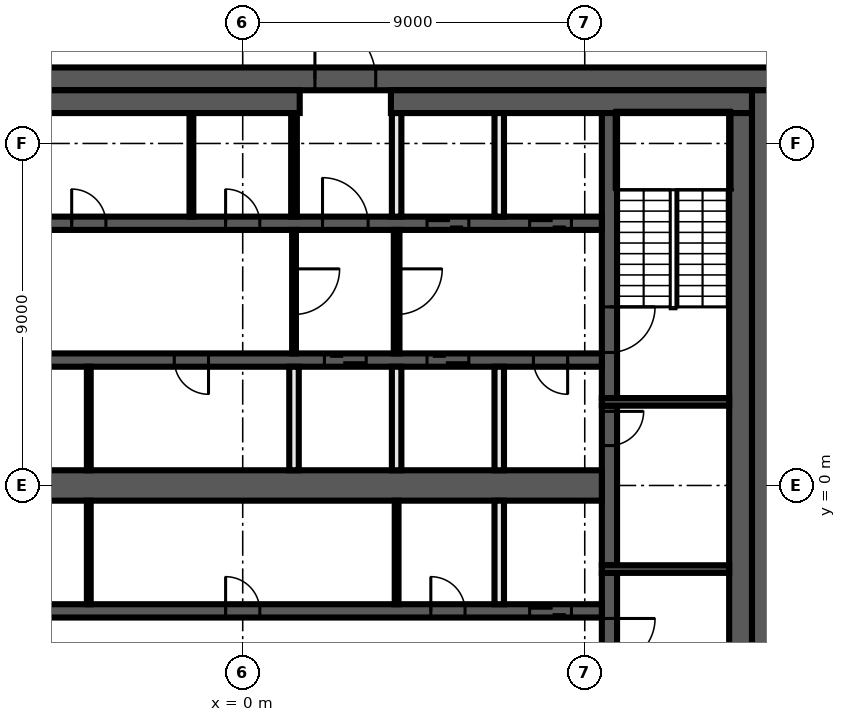
"""IFC4 building model, lengths in metres.
Left out: names, types, materials, properties, quantities, classifications, styles, units other than length and angle.
Written with IfcOpenShell. Run it as: python <this file> out.ifc"""

import sys

from ifc_helpers import new_model, si_unit, direction, frame, frame_2d, origin, place, context, subcontext, project, spatial, rectangle, extrude, element, fill, save


model = new_model("IFC4")
c1 = context("Model", 3, precision=1e-05, world=origin(), true_north=direction((0.0, 1.0)))
c2 = subcontext(c1, "Body", "Model", "MODEL_VIEW")
j1 = project(units=[si_unit("LENGTHUNIT", "METRE"), si_unit("PLANEANGLEUNIT", "RADIAN")], contexts=[c1])
p1 = place(None, origin())
s1 = spatial("IfcSite", under=j1, at=p1, CompositionType="ELEMENT")
p2 = place(p1, origin())
s2 = spatial("IfcBuilding", under=s1, at=p2, CompositionType="ELEMENT")
p3 = place(p2, frame((0.0, 0.0, 348.8)))
s3 = spatial("IfcBuildingStorey", under=s2, at=p3, CompositionType="ELEMENT", Elevation=348.8)
p4 = place(p3, frame((-14.0, 10.7, 0.0), z_axis=(0.0, 0.0, 1.0), x_axis=(1.0, 0.0, 0.0)))
e1 = element("IfcWall", 1, at=p4, inside=s3, PredefinedType="SHEAR", context=c2, shape_type="SweptSolid", body=[
    extrude(rectangle(XDim=28.0, YDim=0.6, at=frame_2d((14.0, 0.0))), origin(), (0.0, 0.0, 1.0), 3.7),
])
p5 = place(p4, frame((15.9, 0.0, 0.0)))
e2 = element("IfcOpeningElement", 2, at=p5, cuts=e1, PredefinedType="OPENING", context=c2, shape_type="SweptSolid", body=[
    extrude(rectangle(XDim=1.6, YDim=2.1, at=frame_2d((0.8, 1.05))), frame((0.0, 0.31, 0.0), z_axis=(0.0, -1.0, 0.0), x_axis=(1.0, 0.0, 0.0)), (0.0, 0.0, 1.0), 0.62),
])
p6 = place(p3, frame((13.7, 10.4, 0.0), z_axis=(0.0, 0.0, 1.0), x_axis=(0.0, -1.0, 0.0)))
e3 = element("IfcWall", 3, at=p6, inside=s3, PredefinedType="SHEAR", context=c2, shape_type="SweptSolid", body=[
    extrude(rectangle(XDim=20.8, YDim=0.6, at=frame_2d((10.4, 0.0))), origin(), (0.0, 0.0, 1.0), 3.7),
])
p7 = place(p3, frame((-13.4, 10.1, 0.0), z_axis=(0.0, 0.0, 1.0), x_axis=(1.0, 0.0, 0.0)))
e4 = element("IfcWall", 4, at=p7, inside=s3, PredefinedType="SHEAR", context=c2, shape_type="SweptSolid", body=[
    extrude(rectangle(XDim=14.9, YDim=0.6, at=frame_2d((7.45, 0.0))), origin(), (0.0, 0.0, 1.0), 3.7),
])
p8 = place(p3, frame((3.9, 10.1, 0.0), z_axis=(0.0, 0.0, 1.0), x_axis=(1.0, 0.0, 0.0)))
e5 = element("IfcWall", 5, at=p8, inside=s3, PredefinedType="SHEAR", context=c2, shape_type="SweptSolid", body=[
    extrude(rectangle(XDim=9.5, YDim=0.6, at=frame_2d((4.75, 0.0))), origin(), (0.0, 0.0, 1.0), 3.7),
])
p9 = place(p3, frame((13.1, 9.8, 0.0), z_axis=(0.0, 0.0, 1.0), x_axis=(0.0, -1.0, 0.0)))
e6 = element("IfcWall", 6, at=p9, inside=s3, PredefinedType="SHEAR", context=c2, shape_type="SweptSolid", body=[
    extrude(rectangle(XDim=19.6, YDim=0.6, at=frame_2d((9.8, 0.0))), origin(), (0.0, 0.0, 1.0), 3.7),
])
p10 = place(p3, frame((9.65, -2.3, 0.0), z_axis=(0.0, 0.0, 1.0), x_axis=(0.0, -1.0, 0.0)))
e7 = element("IfcWall", 7, at=p10, inside=s3, PredefinedType="SHEAR", context=c2, shape_type="SweptSolid", body=[
    extrude(rectangle(XDim=7.5, YDim=0.4, at=frame_2d((3.75, 0.0))), origin(), (0.0, 0.0, 1.0), 3.7),
])
p11 = place(p10, frame((1.2, 0.0, 0.0)))
e8 = element("IfcOpeningElement", 8, at=p11, cuts=e7, PredefinedType="OPENING", context=c2, shape_type="SweptSolid", body=[
    extrude(rectangle(XDim=1.2, YDim=2.1, at=frame_2d((0.6, 1.05))), frame((0.0, 0.21, 0.0), z_axis=(0.0, -1.0, 0.0), x_axis=(1.0, 0.0, 0.0)), (0.0, 0.0, 1.0), 0.42),
])
p12 = place(p3, frame((9.65, 2.1, 0.0), z_axis=(0.0, 0.0, 1.0), x_axis=(0.0, -1.0, 0.0)))
e9 = element("IfcWall", 9, at=p12, inside=s3, PredefinedType="SHEAR", context=c2, shape_type="SweptSolid", body=[
    extrude(rectangle(XDim=4.2, YDim=0.4, at=frame_2d((2.1, 0.0))), origin(), (0.0, 0.0, 1.0), 3.7),
])
p13 = place(p12, frame((0.15, 0.0, 0.0)))
e10 = element("IfcOpeningElement", 10, at=p13, cuts=e9, PredefinedType="OPENING", context=c2, shape_type="SweptSolid", body=[
    extrude(rectangle(XDim=0.9, YDim=2.1, at=frame_2d((0.45, 1.05))), frame((0.0, 0.21, 0.0), z_axis=(0.0, -1.0, 0.0), x_axis=(1.0, 0.0, 0.0)), (0.0, 0.0, 1.0), 0.42),
])
p14 = place(p3, frame((9.65, 9.8, 0.0), z_axis=(0.0, 0.0, 1.0), x_axis=(0.0, -1.0, 0.0)))
e11 = element("IfcWall", 11, at=p14, inside=s3, PredefinedType="SHEAR", context=c2, shape_type="SweptSolid", body=[
    extrude(rectangle(XDim=7.5, YDim=0.4, at=frame_2d((3.75, 0.0))), origin(), (0.0, 0.0, 1.0), 3.7),
])
p15 = place(p14, frame((5.1, 0.0, 0.0)))
e12 = element("IfcOpeningElement", 12, at=p15, cuts=e11, PredefinedType="OPENING", context=c2, shape_type="SweptSolid", body=[
    extrude(rectangle(XDim=1.2, YDim=2.1, at=frame_2d((0.6, 1.05))), frame((0.0, 0.21, 0.0), z_axis=(0.0, -1.0, 0.0), x_axis=(1.0, 0.0, 0.0)), (0.0, 0.0, 1.0), 0.42),
])
for number, where, z_axis, x_axis in (
    (13, (9.45, 2.2, 0.0), (0.0, 0.0, 1.0), (1.0, 0.0, 0.0)),
    (14, (9.45, -2.2, 0.0), (0.0, 0.0, 1.0), (1.0, 0.0, 0.0)),
):
    element("IfcWall", number, at=place(p3, frame(where, z_axis=z_axis, x_axis=x_axis)), inside=s3, PredefinedType="SHEAR", context=c2, shape_type="SweptSolid", body=[
        extrude(rectangle(XDim=3.35, YDim=0.2, at=frame_2d((1.675, 0.0))), origin(), (0.0, 0.0, 1.0), 3.7),
    ])
p16 = place(p3, frame((-9.45, 6.9, 0.0), z_axis=(0.0, 0.0, 1.0), x_axis=(1.0, 0.0, 0.0)))
e15 = element("IfcWall", 15, at=p16, inside=s3, PredefinedType="SHEAR", context=c2, shape_type="SweptSolid", body=[
    extrude(rectangle(XDim=18.9, YDim=0.35, at=frame_2d((9.45, 0.0))), origin(), (0.0, 0.0, 1.0), 3.7),
])
p17 = place(p16, frame((11.55, 0.0, 0.0)))
e16 = element("IfcOpeningElement", 16, at=p17, cuts=e15, PredefinedType="OPENING", context=c2, shape_type="SweptSolid", body=[
    extrude(rectangle(XDim=1.2, YDim=2.1, at=frame_2d((0.6, 1.05))), frame((0.0, 0.185, 0.0), z_axis=(0.0, -1.0, 0.0), x_axis=(1.0, 0.0, 0.0)), (0.0, 0.0, 1.0), 0.37),
])
p18 = place(p16, frame((14.3, 0.0, 0.0)))
e17 = element("IfcOpeningElement", 17, at=p18, cuts=e15, PredefinedType="OPENING", context=c2, shape_type="SweptSolid", body=[
    extrude(rectangle(XDim=1.1, YDim=2.1, at=frame_2d((0.55, 1.05))), frame((0.0, 0.185, 0.0), z_axis=(0.0, -1.0, 0.0), x_axis=(1.0, 0.0, 0.0)), (0.0, 0.0, 1.0), 0.37),
])
p19 = place(p16, frame((17.0, 0.0, 0.0)))
e18 = element("IfcOpeningElement", 18, at=p19, cuts=e15, PredefinedType="OPENING", context=c2, shape_type="SweptSolid", body=[
    extrude(rectangle(XDim=1.1, YDim=2.1, at=frame_2d((0.55, 1.05))), frame((0.0, 0.185, 0.0), z_axis=(0.0, -1.0, 0.0), x_axis=(1.0, 0.0, 0.0)), (0.0, 0.0, 1.0), 0.37),
])
p20 = place(p16, frame((0.9, 0.0, 0.0)))
e19 = element("IfcOpeningElement", 19, at=p20, cuts=e15, PredefinedType="OPENING", context=c2, shape_type="SweptSolid", body=[
    extrude(rectangle(XDim=0.9, YDim=2.1, at=frame_2d((0.45, 1.05))), frame((0.0, 0.185, 0.0), z_axis=(0.0, -1.0, 0.0), x_axis=(1.0, 0.0, 0.0)), (0.0, 0.0, 1.0), 0.37),
])
p21 = place(p16, frame((4.95, 0.0, 0.0)))
e20 = element("IfcOpeningElement", 20, at=p21, cuts=e15, PredefinedType="OPENING", context=c2, shape_type="SweptSolid", body=[
    extrude(rectangle(XDim=0.9, YDim=2.1, at=frame_2d((0.45, 1.05))), frame((0.0, 0.185, 0.0), z_axis=(0.0, -1.0, 0.0), x_axis=(1.0, 0.0, 0.0)), (0.0, 0.0, 1.0), 0.37),
])
p22 = place(p16, frame((9.0, 0.0, 0.0)))
e21 = element("IfcOpeningElement", 21, at=p22, cuts=e15, PredefinedType="OPENING", context=c2, shape_type="SweptSolid", body=[
    extrude(rectangle(XDim=0.9, YDim=2.1, at=frame_2d((0.45, 1.05))), frame((0.0, 0.185, 0.0), z_axis=(0.0, -1.0, 0.0), x_axis=(1.0, 0.0, 0.0)), (0.0, 0.0, 1.0), 0.37),
])
p23 = place(p3, frame((9.45, 3.3, 0.0), z_axis=(0.0, 0.0, 1.0), x_axis=(-1.0, 0.0, 0.0)))
e22 = element("IfcWall", 22, at=p23, inside=s3, PredefinedType="SHEAR", context=c2, shape_type="SweptSolid", body=[
    extrude(rectangle(XDim=18.9, YDim=0.35, at=frame_2d((9.45, 0.0))), origin(), (0.0, 0.0, 1.0), 3.7),
])
p24 = place(p23, frame((6.2, 0.0, 0.0)))
e23 = element("IfcOpeningElement", 23, at=p24, cuts=e22, PredefinedType="OPENING", context=c2, shape_type="SweptSolid", body=[
    extrude(rectangle(XDim=1.1, YDim=2.1, at=frame_2d((0.55, 1.05))), frame((0.0, 0.185, 0.0), z_axis=(0.0, -1.0, 0.0), x_axis=(1.0, 0.0, 0.0)), (0.0, 0.0, 1.0), 0.37),
])
p25 = place(p23, frame((3.5, 0.0, 0.0)))
e24 = element("IfcOpeningElement", 24, at=p25, cuts=e22, PredefinedType="OPENING", context=c2, shape_type="SweptSolid", body=[
    extrude(rectangle(XDim=1.1, YDim=2.1, at=frame_2d((0.55, 1.05))), frame((0.0, 0.185, 0.0), z_axis=(0.0, -1.0, 0.0), x_axis=(1.0, 0.0, 0.0)), (0.0, 0.0, 1.0), 0.37),
])
p26 = place(p23, frame((0.9, 0.0, 0.0)))
e25 = element("IfcOpeningElement", 25, at=p26, cuts=e22, PredefinedType="OPENING", context=c2, shape_type="SweptSolid", body=[
    extrude(rectangle(XDim=0.9, YDim=2.1, at=frame_2d((0.45, 1.05))), frame((0.0, 0.185, 0.0), z_axis=(0.0, -1.0, 0.0), x_axis=(1.0, 0.0, 0.0)), (0.0, 0.0, 1.0), 0.37),
])
p27 = place(p23, frame((15.75, 0.0, 0.0)))
e26 = element("IfcOpeningElement", 26, at=p27, cuts=e22, PredefinedType="OPENING", context=c2, shape_type="SweptSolid", body=[
    extrude(rectangle(XDim=0.9, YDim=2.1, at=frame_2d((0.45, 1.05))), frame((0.0, 0.185, 0.0), z_axis=(0.0, -1.0, 0.0), x_axis=(1.0, 0.0, 0.0)), (0.0, 0.0, 1.0), 0.37),
])
p28 = place(p23, frame((10.35, 0.0, 0.0)))
e27 = element("IfcOpeningElement", 27, at=p28, cuts=e22, PredefinedType="OPENING", context=c2, shape_type="SweptSolid", body=[
    extrude(rectangle(XDim=0.9, YDim=2.1, at=frame_2d((0.45, 1.05))), frame((0.0, 0.185, 0.0), z_axis=(0.0, -1.0, 0.0), x_axis=(1.0, 0.0, 0.0)), (0.0, 0.0, 1.0), 0.37),
])
p29 = place(p3, frame((-9.45, -3.3, 0.0), z_axis=(0.0, 0.0, 1.0), x_axis=(1.0, 0.0, 0.0)))
e28 = element("IfcWall", 28, at=p29, inside=s3, PredefinedType="SHEAR", context=c2, shape_type="SweptSolid", body=[
    extrude(rectangle(XDim=18.9, YDim=0.35, at=frame_2d((9.45, 0.0))), origin(), (0.0, 0.0, 1.0), 3.7),
])
p30 = place(p29, frame((17.0, 0.0, 0.0)))
e29 = element("IfcOpeningElement", 29, at=p30, cuts=e28, PredefinedType="OPENING", context=c2, shape_type="SweptSolid", body=[
    extrude(rectangle(XDim=1.1, YDim=2.1, at=frame_2d((0.55, 1.05))), frame((0.0, 0.185, 0.0), z_axis=(0.0, -1.0, 0.0), x_axis=(1.0, 0.0, 0.0)), (0.0, 0.0, 1.0), 0.37),
])
p31 = place(p29, frame((2.25, 0.0, 0.0)))
e30 = element("IfcOpeningElement", 30, at=p31, cuts=e28, PredefinedType="OPENING", context=c2, shape_type="SweptSolid", body=[
    extrude(rectangle(XDim=0.9, YDim=2.1, at=frame_2d((0.45, 1.05))), frame((0.0, 0.185, 0.0), z_axis=(0.0, -1.0, 0.0), x_axis=(1.0, 0.0, 0.0)), (0.0, 0.0, 1.0), 0.37),
])
p32 = place(p29, frame((9.0, 0.0, 0.0)))
e31 = element("IfcOpeningElement", 31, at=p32, cuts=e28, PredefinedType="OPENING", context=c2, shape_type="SweptSolid", body=[
    extrude(rectangle(XDim=0.9, YDim=2.1, at=frame_2d((0.45, 1.05))), frame((0.0, 0.185, 0.0), z_axis=(0.0, -1.0, 0.0), x_axis=(1.0, 0.0, 0.0)), (0.0, 0.0, 1.0), 0.37),
])
p33 = place(p29, frame((14.4, 0.0, 0.0)))
e32 = element("IfcOpeningElement", 32, at=p33, cuts=e28, PredefinedType="OPENING", context=c2, shape_type="SweptSolid", body=[
    extrude(rectangle(XDim=0.9, YDim=2.1, at=frame_2d((0.45, 1.05))), frame((0.0, 0.185, 0.0), z_axis=(0.0, -1.0, 0.0), x_axis=(1.0, 0.0, 0.0)), (0.0, 0.0, 1.0), 0.37),
])
p34 = place(p3, frame((-9.45, 0.0, 0.0), z_axis=(0.0, 0.0, 1.0), x_axis=(1.0, 0.0, 0.0)))
e33 = element("IfcWall", 33, at=p34, inside=s3, PredefinedType="SHEAR", context=c2, shape_type="SweptSolid", body=[
    extrude(rectangle(XDim=18.9, YDim=0.8, at=frame_2d((9.45, 0.0))), origin(), (0.0, 0.0, 1.0), 3.7),
])
for number, where, z_axis, x_axis in (
    (34, (6.75, -3.125, 0.0), (0.0, 0.0, 1.0), (0.0, 1.0, 0.0)),
    (35, (6.75, 0.4, 0.0), (0.0, 0.0, 1.0), (0.0, 1.0, 0.0)),
    (36, (6.75, 7.075, 0.0), (0.0, 0.0, 1.0), (0.0, 1.0, 0.0)),
):
    element("IfcWall", number, at=place(p3, frame(where, z_axis=z_axis, x_axis=x_axis)), inside=s3, PredefinedType="SOLIDWALL", context=c2, shape_type="SweptSolid", body=[
        extrude(rectangle(XDim=2.725, YDim=0.25, at=frame_2d((1.363, 0.0))), origin(), (0.0, 0.0, 1.0), 3.7),
    ])
p35 = place(p3, frame((4.05, 6.725, 0.0), z_axis=(0.0, 0.0, 1.0), x_axis=(0.0, -1.0, 0.0)))
e37 = element("IfcWall", 37, at=p35, inside=s3, PredefinedType="PARTITIONING", context=c2, shape_type="SweptSolid", body=[
    extrude(rectangle(XDim=3.25, YDim=0.15, at=frame_2d((1.625, 0.0))), origin(), (0.0, 0.0, 1.0), 3.7),
])
p36 = place(p35, frame((1.025, 0.0, 0.0)))
e38 = element("IfcOpeningElement", 38, at=p36, cuts=e37, PredefinedType="OPENING", context=c2, shape_type="SweptSolid", body=[
    extrude(rectangle(XDim=1.2, YDim=2.1, at=frame_2d((0.6, 1.05))), frame((0.0, 0.085, 0.0), z_axis=(0.0, -1.0, 0.0), x_axis=(1.0, 0.0, 0.0)), (0.0, 0.0, 1.0), 0.17),
])
p37 = place(p3, frame((4.05, -3.125, 0.0), z_axis=(0.0, 0.0, 1.0), x_axis=(0.0, 1.0, 0.0)))
e39 = element("IfcWall", 39, at=p37, inside=s3, PredefinedType="PARTITIONING", context=c2, shape_type="SweptSolid", body=[
    extrude(rectangle(XDim=2.725, YDim=0.1, at=frame_2d((1.363, 0.0))), origin(), (0.0, 0.0, 1.0), 3.7),
])
for number, where, z_axis, x_axis in (
    (40, (4.05, 0.4, 0.0), (0.0, 0.0, 1.0), (0.0, 1.0, 0.0)),
    (41, (4.05, 7.075, 0.0), (0.0, 0.0, 1.0), (0.0, 1.0, 0.0)),
):
    element("IfcWall", number, at=place(p3, frame(where, z_axis=z_axis, x_axis=x_axis)), inside=s3, PredefinedType="SOLIDWALL", context=c2, shape_type="SweptSolid", body=[
        extrude(rectangle(XDim=2.725, YDim=0.25, at=frame_2d((1.363, 0.0))), origin(), (0.0, 0.0, 1.0), 3.7),
    ])
p38 = place(p3, frame((1.35, 7.075, 0.0), z_axis=(0.0, 0.0, 1.0), x_axis=(0.0, 1.0, 0.0)))
e42 = element("IfcWall", 42, at=p38, inside=s3, PredefinedType="PARTITIONING", context=c2, shape_type="SweptSolid", body=[
    extrude(rectangle(XDim=2.725, YDim=0.15, at=frame_2d((1.363, 0.0))), origin(), (0.0, 0.0, 1.0), 3.7),
])
p39 = place(p3, frame((1.35, 6.725, 0.0), z_axis=(0.0, 0.0, 1.0), x_axis=(0.0, -1.0, 0.0)))
e43 = element("IfcWall", 43, at=p39, inside=s3, PredefinedType="PARTITIONING", context=c2, shape_type="SweptSolid", body=[
    extrude(rectangle(XDim=3.25, YDim=0.1, at=frame_2d((1.625, 0.0))), origin(), (0.0, 0.0, 1.0), 3.7),
])
p40 = place(p39, frame((1.025, 0.0, 0.0)))
e44 = element("IfcOpeningElement", 44, at=p40, cuts=e43, PredefinedType="OPENING", context=c2, shape_type="SweptSolid", body=[
    extrude(rectangle(XDim=1.2, YDim=2.1, at=frame_2d((0.6, 1.05))), frame((0.0, 0.06, 0.0), z_axis=(0.0, -1.0, 0.0), x_axis=(1.0, 0.0, 0.0)), (0.0, 0.0, 1.0), 0.12),
])
p41 = place(p3, frame((1.35, 0.4, 0.0), z_axis=(0.0, 0.0, 1.0), x_axis=(0.0, 1.0, 0.0)))
e45 = element("IfcWall", 45, at=p41, inside=s3, PredefinedType="SOLIDWALL", context=c2, shape_type="SweptSolid", body=[
    extrude(rectangle(XDim=2.725, YDim=0.25, at=frame_2d((1.363, 0.0))), origin(), (0.0, 0.0, 1.0), 3.7),
])
for number, where, z_axis, x_axis in (
    (46, (-1.35, 7.075, 0.0), (0.0, 0.0, 1.0), (0.0, 1.0, 0.0)),
    (47, (-4.05, -3.125, 0.0), (0.0, 0.0, 1.0), (0.0, 1.0, 0.0)),
    (48, (-4.05, 0.4, 0.0), (0.0, 0.0, 1.0), (0.0, 1.0, 0.0)),
):
    element("IfcWall", number, at=place(p3, frame(where, z_axis=z_axis, x_axis=x_axis)), inside=s3, PredefinedType="PARTITIONING", context=c2, shape_type="SweptSolid", body=[
        extrude(rectangle(XDim=2.725, YDim=0.1, at=frame_2d((1.363, 0.0))), origin(), (0.0, 0.0, 1.0), 3.7),
    ])
p42 = place(p13, origin())
e49 = element("IfcDoor", 49, at=p42, inside=s3, OperationType="SINGLE_SWING_RIGHT", PredefinedType="DOOR", context=c2, shape_type="SweptSolid", body=[
    extrude(rectangle(XDim=0.9, YDim=2.1, at=frame_2d((0.45, 1.05))), frame((0.0, 0.025, 0.0), z_axis=(0.0, -1.0, 0.0), x_axis=(1.0, 0.0, 0.0)), (0.0, 0.0, 1.0), 0.05),
])
fill(e10, e49)
p43 = place(p5, origin())
e50 = element("IfcDoor", 50, at=p43, inside=s3, OperationType="DOUBLE_DOOR_SINGLE_SWING", PredefinedType="DOOR", context=c2, shape_type="SweptSolid", body=[
    extrude(rectangle(XDim=1.6, YDim=2.1, at=frame_2d((0.8, 1.05))), frame((0.0, 0.025, 0.0), z_axis=(0.0, -1.0, 0.0), x_axis=(1.0, 0.0, 0.0)), (0.0, 0.0, 1.0), 0.05),
])
fill(e2, e50)
p44 = place(p17, origin())
e51 = element("IfcDoor", 51, at=p44, inside=s3, OperationType="SINGLE_SWING_LEFT", PredefinedType="DOOR", context=c2, shape_type="SweptSolid", body=[
    extrude(rectangle(XDim=1.2, YDim=2.1, at=frame_2d((0.6, 1.05))), frame((0.0, 0.025, 0.0), z_axis=(0.0, -1.0, 0.0), x_axis=(1.0, 0.0, 0.0)), (0.0, 0.0, 1.0), 0.05),
])
fill(e16, e51)
p45 = place(p18, origin())
e52 = element("IfcDoor", 52, at=p45, inside=s3, OperationType="DOUBLE_DOOR_SLIDING", PredefinedType="DOOR", context=c2, shape_type="SweptSolid", body=[
    extrude(rectangle(XDim=1.1, YDim=2.1, at=frame_2d((0.55, 1.05))), frame((0.0, 0.025, 0.0), z_axis=(0.0, -1.0, 0.0), x_axis=(1.0, 0.0, 0.0)), (0.0, 0.0, 1.0), 0.05),
])
fill(e17, e52)
p46 = place(p19, origin())
e53 = element("IfcDoor", 53, at=p46, inside=s3, OperationType="DOUBLE_DOOR_SLIDING", PredefinedType="DOOR", context=c2, shape_type="SweptSolid", body=[
    extrude(rectangle(XDim=1.1, YDim=2.1, at=frame_2d((0.55, 1.05))), frame((0.0, 0.025, 0.0), z_axis=(0.0, -1.0, 0.0), x_axis=(1.0, 0.0, 0.0)), (0.0, 0.0, 1.0), 0.05),
])
fill(e18, e53)
p47 = place(p24, origin())
e54 = element("IfcDoor", 54, at=p47, inside=s3, OperationType="DOUBLE_DOOR_SLIDING", PredefinedType="DOOR", context=c2, shape_type="SweptSolid", body=[
    extrude(rectangle(XDim=1.1, YDim=2.1, at=frame_2d((0.55, 1.05))), frame((0.0, 0.025, 0.0), z_axis=(0.0, -1.0, 0.0), x_axis=(1.0, 0.0, 0.0)), (0.0, 0.0, 1.0), 0.05),
])
fill(e23, e54)
p48 = place(p25, origin())
e55 = element("IfcDoor", 55, at=p48, inside=s3, OperationType="DOUBLE_DOOR_SLIDING", PredefinedType="DOOR", context=c2, shape_type="SweptSolid", body=[
    extrude(rectangle(XDim=1.1, YDim=2.1, at=frame_2d((0.55, 1.05))), frame((0.0, 0.025, 0.0), z_axis=(0.0, -1.0, 0.0), x_axis=(1.0, 0.0, 0.0)), (0.0, 0.0, 1.0), 0.05),
])
fill(e24, e55)
p49 = place(p26, origin())
e56 = element("IfcDoor", 56, at=p49, inside=s3, OperationType="SINGLE_SWING_LEFT", PredefinedType="DOOR", context=c2, shape_type="SweptSolid", body=[
    extrude(rectangle(XDim=0.9, YDim=2.1, at=frame_2d((0.45, 1.05))), frame((0.0, 0.025, 0.0), z_axis=(0.0, -1.0, 0.0), x_axis=(1.0, 0.0, 0.0)), (0.0, 0.0, 1.0), 0.05),
])
fill(e25, e56)
p50 = place(p30, origin())
e57 = element("IfcDoor", 57, at=p50, inside=s3, OperationType="DOUBLE_DOOR_SLIDING", PredefinedType="DOOR", context=c2, shape_type="SweptSolid", body=[
    extrude(rectangle(XDim=1.1, YDim=2.1, at=frame_2d((0.55, 1.05))), frame((0.0, 0.025, 0.0), z_axis=(0.0, -1.0, 0.0), x_axis=(1.0, 0.0, 0.0)), (0.0, 0.0, 1.0), 0.05),
])
fill(e29, e57)
p51 = place(p21, origin())
e58 = element("IfcDoor", 58, at=p51, inside=s3, OperationType="SINGLE_SWING_LEFT", PredefinedType="DOOR", context=c2, shape_type="SweptSolid", body=[
    extrude(rectangle(XDim=0.9, YDim=2.1, at=frame_2d((0.45, 1.05))), frame((0.0, 0.025, 0.0), z_axis=(0.0, -1.0, 0.0), x_axis=(1.0, 0.0, 0.0)), (0.0, 0.0, 1.0), 0.05),
])
fill(e20, e58)
p52 = place(p22, origin())
e59 = element("IfcDoor", 59, at=p52, inside=s3, OperationType="SINGLE_SWING_RIGHT", PredefinedType="DOOR", context=c2, shape_type="SweptSolid", body=[
    extrude(rectangle(XDim=0.9, YDim=2.1, at=frame_2d((0.45, 1.05))), frame((0.0, 0.025, 0.0), z_axis=(0.0, -1.0, 0.0), x_axis=(1.0, 0.0, 0.0)), (0.0, 0.0, 1.0), 0.05),
])
fill(e21, e59)
p53 = place(p28, origin())
e60 = element("IfcDoor", 60, at=p53, inside=s3, OperationType="SINGLE_SWING_RIGHT", PredefinedType="DOOR", context=c2, shape_type="SweptSolid", body=[
    extrude(rectangle(XDim=0.9, YDim=2.1, at=frame_2d((0.45, 1.05))), frame((0.0, 0.025, 0.0), z_axis=(0.0, -1.0, 0.0), x_axis=(1.0, 0.0, 0.0)), (0.0, 0.0, 1.0), 0.05),
])
fill(e27, e60)
p54 = place(p32, origin())
e61 = element("IfcDoor", 61, at=p54, inside=s3, OperationType="SINGLE_SWING_RIGHT", PredefinedType="DOOR", context=c2, shape_type="SweptSolid", body=[
    extrude(rectangle(XDim=0.9, YDim=2.1, at=frame_2d((0.45, 1.05))), frame((0.0, 0.025, 0.0), z_axis=(0.0, -1.0, 0.0), x_axis=(1.0, 0.0, 0.0)), (0.0, 0.0, 1.0), 0.05),
])
fill(e31, e61)
p55 = place(p33, origin())
e62 = element("IfcDoor", 62, at=p55, inside=s3, OperationType="SINGLE_SWING_LEFT", PredefinedType="DOOR", context=c2, shape_type="SweptSolid", body=[
    extrude(rectangle(XDim=0.9, YDim=2.1, at=frame_2d((0.45, 1.05))), frame((0.0, 0.025, 0.0), z_axis=(0.0, -1.0, 0.0), x_axis=(1.0, 0.0, 0.0)), (0.0, 0.0, 1.0), 0.05),
])
fill(e32, e62)
p56 = place(p15, origin())
e63 = element("IfcDoor", 63, at=p56, inside=s3, OperationType="SINGLE_SWING_LEFT", PredefinedType="DOOR", context=c2, shape_type="SweptSolid", body=[
    extrude(rectangle(XDim=1.2, YDim=2.1, at=frame_2d((0.6, 1.05))), frame((0.0, 0.025, 0.0), z_axis=(0.0, -1.0, 0.0), x_axis=(1.0, 0.0, 0.0)), (0.0, 0.0, 1.0), 0.05),
])
fill(e12, e63)
p57 = place(p11, origin())
e64 = element("IfcDoor", 64, at=p57, inside=s3, OperationType="SINGLE_SWING_RIGHT", PredefinedType="DOOR", context=c2, shape_type="SweptSolid", body=[
    extrude(rectangle(XDim=1.2, YDim=2.1, at=frame_2d((0.6, 1.05))), frame((0.0, 0.025, 0.0), z_axis=(0.0, -1.0, 0.0), x_axis=(1.0, 0.0, 0.0)), (0.0, 0.0, 1.0), 0.05),
])
fill(e8, e64)
p58 = place(p40, origin())
e65 = element("IfcDoor", 65, at=p58, inside=s3, OperationType="SINGLE_SWING_LEFT", PredefinedType="DOOR", context=c2, shape_type="SweptSolid", body=[
    extrude(rectangle(XDim=1.2, YDim=2.1, at=frame_2d((0.6, 1.05))), frame((0.0, 0.025, 0.0), z_axis=(0.0, -1.0, 0.0), x_axis=(1.0, 0.0, 0.0)), (0.0, 0.0, 1.0), 0.05),
])
fill(e44, e65)
p59 = place(p36, origin())
e66 = element("IfcDoor", 66, at=p59, inside=s3, OperationType="SINGLE_SWING_RIGHT", PredefinedType="DOOR", context=c2, shape_type="SweptSolid", body=[
    extrude(rectangle(XDim=1.2, YDim=2.1, at=frame_2d((0.6, 1.05))), frame((0.0, 0.025, 0.0), z_axis=(0.0, -1.0, 0.0), x_axis=(1.0, 0.0, 0.0)), (0.0, 0.0, 1.0), 0.05),
])
fill(e38, e66)
save(model, sys.argv[1])
